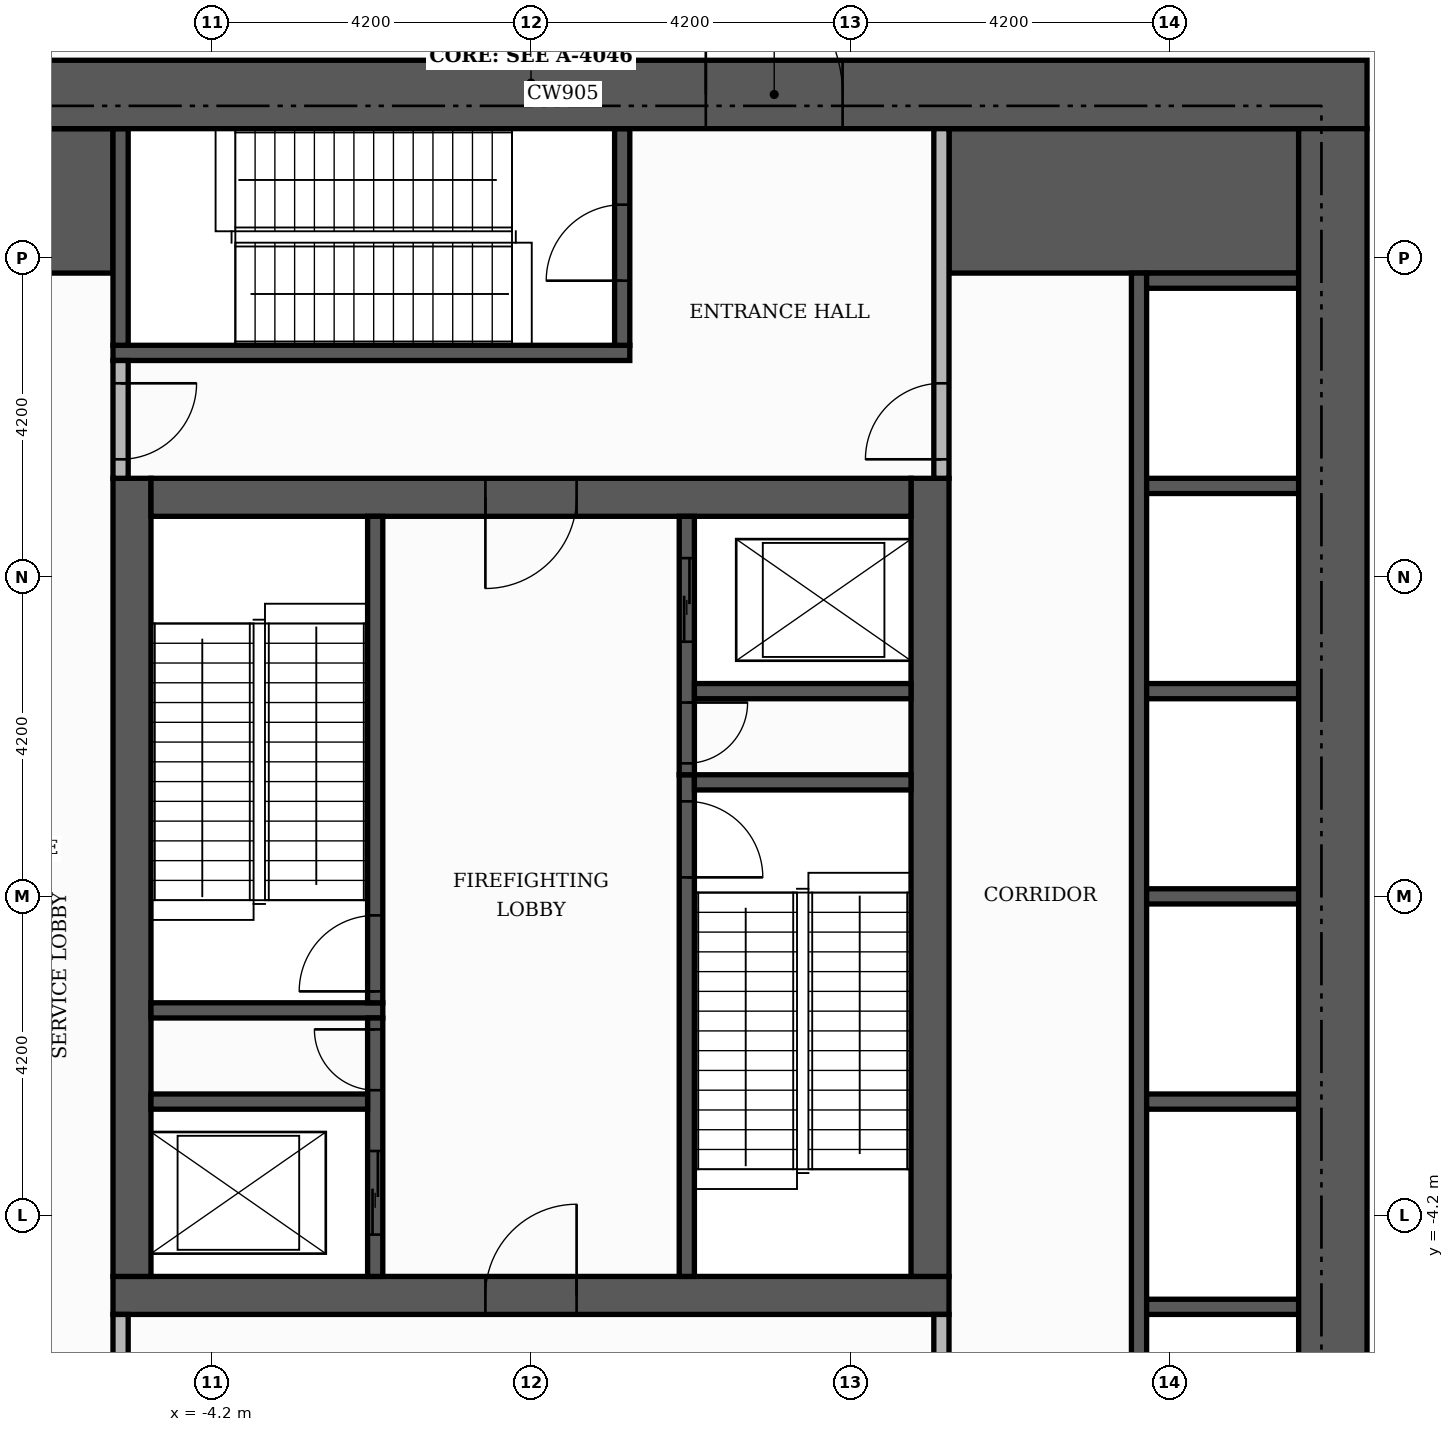
"""IFC4 building model, lengths in metres.
Left out: names, types, materials, properties, quantities, classifications, styles, units other than length and angle.
Written with IfcOpenShell. Run it as: python <this file> out.ifc"""

import sys

from ifc_helpers import new_model, si_unit, direction, frame, frame_2d, origin, place, context, subcontext, project, spatial, rectangle, extrude, element, fill, save


model = new_model("IFC4")
c1 = context("Model", 3, precision=1e-05, world=origin(), true_north=direction((0.0, 1.0)))
c2 = subcontext(c1, "Body", "Model", "MODEL_VIEW")
j1 = project(units=[si_unit("LENGTHUNIT", "METRE"), si_unit("PLANEANGLEUNIT", "RADIAN")], contexts=[c1])
p1 = place(None, origin())
s1 = spatial("IfcSite", under=j1, at=p1, CompositionType="ELEMENT")
p2 = place(p1, origin())
s2 = spatial("IfcBuilding", under=s1, at=p2, CompositionType="ELEMENT")
p3 = place(p2, frame((0.0, 0.0, 287.4)))
s3 = spatial("IfcBuildingStorey", under=s2, at=p3, CompositionType="ELEMENT", Elevation=287.4)
p4 = place(p3, frame((-5.5, -5.25, 0.0), z_axis=(0.0, 0.0, 1.0), x_axis=(1.0, 0.0, 0.0)))
e1 = element("IfcWall", 1, at=p4, inside=s3, PredefinedType="SHEAR", context=c2, shape_type="SweptSolid", body=[
    extrude(rectangle(XDim=11.0, YDim=0.5, at=frame_2d((5.5, 0.0))), origin(), (0.0, 0.0, 1.0), 5.05),
])
p5 = place(p4, frame((4.9, 0.0, 0.0)))
e2 = element("IfcOpeningElement", 2, at=p5, cuts=e1, PredefinedType="OPENING", context=c2, shape_type="SweptSolid", body=[
    extrude(rectangle(XDim=1.2, YDim=2.1, at=frame_2d((0.6, 1.05))), frame((0.0, 0.26, 0.0), z_axis=(0.0, -1.0, 0.0), x_axis=(1.0, 0.0, 0.0)), (0.0, 0.0, 1.0), 0.52),
])
for number, where, z_axis, x_axis in (
    (3, (-5.25, -5.0, 0.0), (0.0, 0.0, 1.0), (0.0, 1.0, 0.0)),
    (4, (5.25, -5.0, 0.0), (0.0, 0.0, 1.0), (0.0, 1.0, 0.0)),
):
    element("IfcWall", number, at=place(p3, frame(where, z_axis=z_axis, x_axis=x_axis)), inside=s3, PredefinedType="SHEAR", context=c2, shape_type="SweptSolid", body=[
        extrude(rectangle(XDim=10.5, YDim=0.5, at=frame_2d((5.25, 0.0))), origin(), (0.0, 0.0, 1.0), 5.05),
    ])
p6 = place(p3, frame((-5.0, 5.25, 0.0), z_axis=(0.0, 0.0, 1.0), x_axis=(1.0, 0.0, 0.0)))
e5 = element("IfcWall", 5, at=p6, inside=s3, PredefinedType="SHEAR", context=c2, shape_type="SweptSolid", body=[
    extrude(rectangle(XDim=10.0, YDim=0.5, at=frame_2d((5.0, 0.0))), origin(), (0.0, 0.0, 1.0), 5.05),
])
p7 = place(p6, frame((4.4, 0.0, 0.0)))
e6 = element("IfcOpeningElement", 6, at=p7, cuts=e5, PredefinedType="OPENING", context=c2, shape_type="SweptSolid", body=[
    extrude(rectangle(XDim=1.2, YDim=2.1, at=frame_2d((0.6, 1.05))), frame((0.0, 0.26, 0.0), z_axis=(0.0, -1.0, 0.0), x_axis=(1.0, 0.0, 0.0)), (0.0, 0.0, 1.0), 0.52),
])
for number, where, z_axis, x_axis in (
    (7, (-10.1, 9.15, 0.0), (0.0, 0.0, 1.0), (1.0, 0.0, 0.0)),
    (8, (5.5, 9.15, 0.0), (0.0, 0.0, 1.0), (1.0, 0.0, 0.0)),
):
    element("IfcWall", number, at=place(p3, frame(where, z_axis=z_axis, x_axis=x_axis)), inside=s3, PredefinedType="SHEAR", context=c2, shape_type="SweptSolid", body=[
        extrude(rectangle(XDim=4.6, YDim=1.9, at=frame_2d((2.3, 0.0))), origin(), (0.0, 0.0, 1.0), 5.05),
    ])
p8 = place(p3, frame((2.05, -5.0, 0.0), z_axis=(0.0, 0.0, 1.0), x_axis=(0.0, 1.0, 0.0)))
e9 = element("IfcWall", 9, at=p8, inside=s3, PredefinedType="SHEAR", context=c2, shape_type="SweptSolid", body=[
    extrude(rectangle(XDim=6.6, YDim=0.2, at=frame_2d((3.3, 0.0))), origin(), (0.0, 0.0, 1.0), 5.05),
])
p9 = place(p8, frame((5.25, 0.0, 0.0)))
e10 = element("IfcOpeningElement", 10, at=p9, cuts=e9, PredefinedType="OPENING", context=c2, shape_type="SweptSolid", body=[
    extrude(rectangle(XDim=1.0, YDim=2.1, at=frame_2d((0.5, 1.05))), frame((0.0, 0.11, 0.0), z_axis=(0.0, -1.0, 0.0), x_axis=(1.0, 0.0, 0.0)), (0.0, 0.0, 1.0), 0.22),
])
p10 = place(p3, frame((-5.0, -1.5, 0.0), z_axis=(0.0, 0.0, 1.0), x_axis=(1.0, 0.0, 0.0)))
e11 = element("IfcWall", 11, at=p10, inside=s3, PredefinedType="SHEAR", context=c2, shape_type="SweptSolid", body=[
    extrude(rectangle(XDim=3.05, YDim=0.2, at=frame_2d((1.525, 0.0))), origin(), (0.0, 0.0, 1.0), 5.05),
])
p11 = place(p3, frame((-2.05, -1.4, 0.0), z_axis=(0.0, 0.0, 1.0), x_axis=(0.0, 1.0, 0.0)))
e12 = element("IfcWall", 12, at=p11, inside=s3, PredefinedType="SHEAR", context=c2, shape_type="SweptSolid", body=[
    extrude(rectangle(XDim=6.4, YDim=0.2, at=frame_2d((3.2, 0.0))), origin(), (0.0, 0.0, 1.0), 5.05),
])
p12 = place(p11, frame((0.15, 0.0, 0.0)))
e13 = element("IfcOpeningElement", 13, at=p12, cuts=e12, PredefinedType="OPENING", context=c2, shape_type="SweptSolid", body=[
    extrude(rectangle(XDim=1.0, YDim=2.1, at=frame_2d((0.5, 1.05))), frame((0.0, 0.11, 0.0), z_axis=(0.0, -1.0, 0.0), x_axis=(1.0, 0.0, 0.0)), (0.0, 0.0, 1.0), 0.22),
])
p13 = place(p3, frame((2.15, 1.5, 0.0), z_axis=(0.0, 0.0, 1.0), x_axis=(1.0, 0.0, 0.0)))
e14 = element("IfcWall", 14, at=p13, inside=s3, PredefinedType="SHEAR", context=c2, shape_type="SweptSolid", body=[
    extrude(rectangle(XDim=2.85, YDim=0.2, at=frame_2d((1.425, 0.0))), origin(), (0.0, 0.0, 1.0), 5.05),
])
p14 = place(p3, frame((-5.5, 7.15, 0.0), z_axis=(0.0, 0.0, 1.0), x_axis=(1.0, 0.0, 0.0)))
e15 = element("IfcWall", 15, at=p14, inside=s3, PredefinedType="SHEAR", context=c2, shape_type="SweptSolid", body=[
    extrude(rectangle(XDim=6.8, YDim=0.2, at=frame_2d((3.4, 0.0))), origin(), (0.0, 0.0, 1.0), 5.05),
])
p15 = place(p3, frame((-5.4, 7.25, 0.0), z_axis=(0.0, 0.0, 1.0), x_axis=(0.0, 1.0, 0.0)))
e16 = element("IfcWall", 16, at=p15, inside=s3, PredefinedType="SHEAR", context=c2, shape_type="SweptSolid", body=[
    extrude(rectangle(XDim=2.85, YDim=0.2, at=frame_2d((1.425, 0.0))), origin(), (0.0, 0.0, 1.0), 5.05),
])
p16 = place(p3, frame((1.2, 7.25, 0.0), z_axis=(0.0, 0.0, 1.0), x_axis=(0.0, 1.0, 0.0)))
e17 = element("IfcWall", 17, at=p16, inside=s3, PredefinedType="SHEAR", context=c2, shape_type="SweptSolid", body=[
    extrude(rectangle(XDim=2.85, YDim=0.2, at=frame_2d((1.425, 0.0))), origin(), (0.0, 0.0, 1.0), 5.05),
])
p17 = place(p16, frame((0.85, 0.0, 0.0)))
e18 = element("IfcOpeningElement", 18, at=p17, cuts=e17, PredefinedType="OPENING", context=c2, shape_type="SweptSolid", body=[
    extrude(rectangle(XDim=1.0, YDim=2.1, at=frame_2d((0.5, 1.05))), frame((0.0, 0.11, 0.0), z_axis=(0.0, -1.0, 0.0), x_axis=(1.0, 0.0, 0.0)), (0.0, 0.0, 1.0), 0.22),
])
p18 = place(p3, frame((8.0, -8.2, 0.0), z_axis=(0.0, 0.0, 1.0), x_axis=(0.0, 1.0, 0.0)))
e19 = element("IfcWall", 19, at=p18, inside=s3, PredefinedType="SHEAR", context=c2, shape_type="SweptSolid", body=[
    extrude(rectangle(XDim=16.4, YDim=0.2, at=frame_2d((8.2, 0.0))), origin(), (0.0, 0.0, 1.0), 5.05),
])
p19 = place(p3, frame((8.1, -5.4, 0.0), z_axis=(0.0, 0.0, 1.0), x_axis=(1.0, 0.0, 0.0)))
e20 = element("IfcWall", 20, at=p19, inside=s3, PredefinedType="SHEAR", context=c2, shape_type="SweptSolid", body=[
    extrude(rectangle(XDim=2.0, YDim=0.2, at=frame_2d((1.0, 0.0))), origin(), (0.0, 0.0, 1.0), 5.05),
])
p20 = place(p3, frame((-2.05, -5.0, 0.0), z_axis=(0.0, 0.0, 1.0), x_axis=(0.0, 1.0, 0.0)))
e21 = element("IfcWall", 21, at=p20, inside=s3, PredefinedType="SHEAR", context=c2, shape_type="SweptSolid", body=[
    extrude(rectangle(XDim=3.4, YDim=0.2, at=frame_2d((1.7, 0.0))), origin(), (0.0, 0.0, 1.0), 5.05),
])
p21 = place(p20, frame((0.55, 0.0, 0.0)))
e22 = element("IfcOpeningElement", 22, at=p21, cuts=e21, PredefinedType="OPENING", context=c2, shape_type="SweptSolid", body=[
    extrude(rectangle(XDim=1.1, YDim=2.1, at=frame_2d((0.55, 1.05))), frame((0.0, 0.11, 0.0), z_axis=(0.0, -1.0, 0.0), x_axis=(1.0, 0.0, 0.0)), (0.0, 0.0, 1.0), 0.22),
])
p22 = place(p20, frame((2.45, 0.0, 0.0)))
e23 = element("IfcOpeningElement", 23, at=p22, cuts=e21, PredefinedType="OPENING", context=c2, shape_type="SweptSolid", body=[
    extrude(rectangle(XDim=0.8, YDim=2.1, at=frame_2d((0.4, 1.05))), frame((0.0, 0.11, 0.0), z_axis=(0.0, -1.0, 0.0), x_axis=(1.0, 0.0, 0.0)), (0.0, 0.0, 1.0), 0.22),
])
p23 = place(p3, frame((-5.0, -2.7, 0.0), z_axis=(0.0, 0.0, 1.0), x_axis=(1.0, 0.0, 0.0)))
e24 = element("IfcWall", 24, at=p23, inside=s3, PredefinedType="SHEAR", context=c2, shape_type="SweptSolid", body=[
    extrude(rectangle(XDim=2.85, YDim=0.2, at=frame_2d((1.425, 0.0))), origin(), (0.0, 0.0, 1.0), 5.05),
])
for number, where, z_axis, x_axis in (
    (25, (8.1, -2.7, 0.0), (0.0, 0.0, 1.0), (1.0, 0.0, 0.0)),
    (26, (8.1, 0.0, 0.0), (0.0, 0.0, 1.0), (1.0, 0.0, 0.0)),
):
    element("IfcWall", number, at=place(p3, frame(where, z_axis=z_axis, x_axis=x_axis)), inside=s3, PredefinedType="SHEAR", context=c2, shape_type="SweptSolid", body=[
        extrude(rectangle(XDim=2.0, YDim=0.2, at=frame_2d((1.0, 0.0))), origin(), (0.0, 0.0, 1.0), 5.05),
    ])
p24 = place(p3, frame((2.05, 1.6, 0.0), z_axis=(0.0, 0.0, 1.0), x_axis=(0.0, 1.0, 0.0)))
e27 = element("IfcWall", 27, at=p24, inside=s3, PredefinedType="SHEAR", context=c2, shape_type="SweptSolid", body=[
    extrude(rectangle(XDim=3.4, YDim=0.2, at=frame_2d((1.7, 0.0))), origin(), (0.0, 0.0, 1.0), 5.05),
])
p25 = place(p24, frame((1.75, 0.0, 0.0)))
e28 = element("IfcOpeningElement", 28, at=p25, cuts=e27, PredefinedType="OPENING", context=c2, shape_type="SweptSolid", body=[
    extrude(rectangle(XDim=1.1, YDim=2.1, at=frame_2d((0.55, 1.05))), frame((0.0, 0.11, 0.0), z_axis=(0.0, -1.0, 0.0), x_axis=(1.0, 0.0, 0.0)), (0.0, 0.0, 1.0), 0.22),
])
p26 = place(p24, frame((0.15, 0.0, 0.0)))
e29 = element("IfcOpeningElement", 29, at=p26, cuts=e27, PredefinedType="OPENING", context=c2, shape_type="SweptSolid", body=[
    extrude(rectangle(XDim=0.8, YDim=2.1, at=frame_2d((0.4, 1.05))), frame((0.0, 0.11, 0.0), z_axis=(0.0, -1.0, 0.0), x_axis=(1.0, 0.0, 0.0)), (0.0, 0.0, 1.0), 0.22),
])
p27 = place(p3, frame((2.15, 2.7, 0.0), z_axis=(0.0, 0.0, 1.0), x_axis=(1.0, 0.0, 0.0)))
e30 = element("IfcWall", 30, at=p27, inside=s3, PredefinedType="SHEAR", context=c2, shape_type="SweptSolid", body=[
    extrude(rectangle(XDim=2.85, YDim=0.2, at=frame_2d((1.425, 0.0))), origin(), (0.0, 0.0, 1.0), 5.05),
])
for number, where, z_axis, x_axis in (
    (31, (8.1, 2.7, 0.0), (0.0, 0.0, 1.0), (1.0, 0.0, 0.0)),
    (32, (8.1, 5.4, 0.0), (0.0, 0.0, 1.0), (1.0, 0.0, 0.0)),
    (33, (8.1, 8.1, 0.0), (0.0, 0.0, 1.0), (1.0, 0.0, 0.0)),
):
    element("IfcWall", number, at=place(p3, frame(where, z_axis=z_axis, x_axis=x_axis)), inside=s3, PredefinedType="SHEAR", context=c2, shape_type="SweptSolid", body=[
        extrude(rectangle(XDim=2.0, YDim=0.2, at=frame_2d((1.0, 0.0))), origin(), (0.0, 0.0, 1.0), 5.05),
    ])
p28 = place(p3, frame((-11.0, 10.55, 0.0), z_axis=(0.0, 0.0, 1.0), x_axis=(1.0, 0.0, 0.0)))
e34 = element("IfcWall", 34, at=p28, inside=s3, PredefinedType="SHEAR", context=c2, shape_type="SweptSolid", body=[
    extrude(rectangle(XDim=22.0, YDim=0.9, at=frame_2d((11.0, 0.0))), origin(), (0.0, 0.0, 1.0), 5.05),
])
p29 = place(p28, frame((13.3, 0.0, 0.0)))
e35 = element("IfcOpeningElement", 35, at=p29, cuts=e34, PredefinedType="OPENING", context=c2, shape_type="SweptSolid", body=[
    extrude(rectangle(XDim=1.8, YDim=2.2, at=frame_2d((0.9, 1.1))), frame((0.0, 0.46, 0.0), z_axis=(0.0, -1.0, 0.0), x_axis=(1.0, 0.0, 0.0)), (0.0, 0.0, 1.0), 0.92),
])
p30 = place(p3, frame((10.55, -10.1, 0.0), z_axis=(0.0, 0.0, 1.0), x_axis=(0.0, 1.0, 0.0)))
e36 = element("IfcWall", 36, at=p30, inside=s3, PredefinedType="SHEAR", context=c2, shape_type="SweptSolid", body=[
    extrude(rectangle(XDim=20.2, YDim=0.9, at=frame_2d((10.1, 0.0))), origin(), (0.0, 0.0, 1.0), 5.05),
])
p31 = place(p3, frame((-5.4, -10.1, 0.0), z_axis=(0.0, 0.0, 1.0), x_axis=(0.0, 1.0, 0.0)))
e37 = element("IfcWall", 37, at=p31, inside=s3, PredefinedType="PARTITIONING", context=c2, shape_type="SweptSolid", body=[
    extrude(rectangle(XDim=4.6, YDim=0.2, at=frame_2d((2.3, 0.0))), origin(), (0.0, 0.0, 1.0), 5.05),
])
p32 = place(p31, frame((2.9, 0.0, 0.0)))
e38 = element("IfcOpeningElement", 38, at=p32, cuts=e37, PredefinedType="OPENING", context=c2, shape_type="SweptSolid", body=[
    extrude(rectangle(XDim=1.0, YDim=2.1, at=frame_2d((0.5, 1.05))), frame((0.0, 0.11, 0.0), z_axis=(0.0, -1.0, 0.0), x_axis=(1.0, 0.0, 0.0)), (0.0, 0.0, 1.0), 0.22),
])
p33 = place(p3, frame((5.4, -10.1, 0.0), z_axis=(0.0, 0.0, 1.0), x_axis=(0.0, 1.0, 0.0)))
e39 = element("IfcWall", 39, at=p33, inside=s3, PredefinedType="PARTITIONING", context=c2, shape_type="SweptSolid", body=[
    extrude(rectangle(XDim=4.6, YDim=0.2, at=frame_2d((2.3, 0.0))), origin(), (0.0, 0.0, 1.0), 5.05),
])
p34 = place(p33, frame((2.9, 0.0, 0.0)))
e40 = element("IfcOpeningElement", 40, at=p34, cuts=e39, PredefinedType="OPENING", context=c2, shape_type="SweptSolid", body=[
    extrude(rectangle(XDim=1.0, YDim=2.1, at=frame_2d((0.5, 1.05))), frame((0.0, 0.11, 0.0), z_axis=(0.0, -1.0, 0.0), x_axis=(1.0, 0.0, 0.0)), (0.0, 0.0, 1.0), 0.22),
])
p35 = place(p3, frame((-5.4, 5.5, 0.0), z_axis=(0.0, 0.0, 1.0), x_axis=(0.0, 1.0, 0.0)))
e41 = element("IfcWall", 41, at=p35, inside=s3, PredefinedType="PARTITIONING", context=c2, shape_type="SweptSolid", body=[
    extrude(rectangle(XDim=1.55, YDim=0.2, at=frame_2d((0.775, 0.0))), origin(), (0.0, 0.0, 1.0), 5.05),
])
p36 = place(p35, frame((0.25, 0.0, 0.0)))
e42 = element("IfcOpeningElement", 42, at=p36, cuts=e41, PredefinedType="OPENING", context=c2, shape_type="SweptSolid", body=[
    extrude(rectangle(XDim=1.0, YDim=2.1, at=frame_2d((0.5, 1.05))), frame((0.0, 0.11, 0.0), z_axis=(0.0, -1.0, 0.0), x_axis=(1.0, 0.0, 0.0)), (0.0, 0.0, 1.0), 0.22),
])
p37 = place(p3, frame((5.4, 5.5, 0.0), z_axis=(0.0, 0.0, 1.0), x_axis=(0.0, 1.0, 0.0)))
e43 = element("IfcWall", 43, at=p37, inside=s3, PredefinedType="PARTITIONING", context=c2, shape_type="SweptSolid", body=[
    extrude(rectangle(XDim=4.6, YDim=0.2, at=frame_2d((2.3, 0.0))), origin(), (0.0, 0.0, 1.0), 5.05),
])
p38 = place(p37, frame((0.25, 0.0, 0.0)))
e44 = element("IfcOpeningElement", 44, at=p38, cuts=e43, PredefinedType="OPENING", context=c2, shape_type="SweptSolid", body=[
    extrude(rectangle(XDim=1.0, YDim=2.1, at=frame_2d((0.5, 1.05))), frame((0.0, 0.11, 0.0), z_axis=(0.0, -1.0, 0.0), x_axis=(1.0, 0.0, 0.0)), (0.0, 0.0, 1.0), 0.22),
])
p39 = place(p25, origin())
e45 = element("IfcDoor", 45, at=p39, inside=s3, OperationType="SLIDING_TO_LEFT", PredefinedType="DOOR", context=c2, shape_type="SweptSolid", body=[
    extrude(rectangle(XDim=1.1, YDim=2.1, at=frame_2d((0.55, 1.05))), frame((0.0, 0.025, 0.0), z_axis=(0.0, -1.0, 0.0), x_axis=(1.0, 0.0, 0.0)), (0.0, 0.0, 1.0), 0.05),
])
fill(e28, e45)
p40 = place(p21, origin())
e46 = element("IfcDoor", 46, at=p40, inside=s3, OperationType="SLIDING_TO_LEFT", PredefinedType="DOOR", context=c2, shape_type="SweptSolid", body=[
    extrude(rectangle(XDim=1.1, YDim=2.1, at=frame_2d((0.55, 1.05))), frame((0.0, 0.025, 0.0), z_axis=(0.0, -1.0, 0.0), x_axis=(1.0, 0.0, 0.0)), (0.0, 0.0, 1.0), 0.05),
])
fill(e22, e46)
p41 = place(p12, origin())
e47 = element("IfcDoor", 47, at=p41, inside=s3, OperationType="SINGLE_SWING_LEFT", PredefinedType="DOOR", context=c2, shape_type="SweptSolid", body=[
    extrude(rectangle(XDim=1.0, YDim=2.1, at=frame_2d((0.5, 1.05))), frame((0.0, 0.025, 0.0), z_axis=(0.0, -1.0, 0.0), x_axis=(1.0, 0.0, 0.0)), (0.0, 0.0, 1.0), 0.05),
])
fill(e13, e47)
p42 = place(p9, frame((1.0, 0.0, 0.0), z_axis=(0.0, 0.0, 1.0), x_axis=(-1.0, 0.0, 0.0)))
e48 = element("IfcDoor", 48, at=p42, inside=s3, OperationType="SINGLE_SWING_LEFT", PredefinedType="DOOR", context=c2, shape_type="SweptSolid", body=[
    extrude(rectangle(XDim=1.0, YDim=2.1, at=frame_2d((0.5, 1.05))), frame((0.0, 0.025, 0.0), z_axis=(0.0, -1.0, 0.0), x_axis=(1.0, 0.0, 0.0)), (0.0, 0.0, 1.0), 0.05),
])
fill(e10, e48)
p43 = place(p26, frame((0.8, 0.0, 0.0), z_axis=(0.0, 0.0, 1.0), x_axis=(-1.0, 0.0, 0.0)))
e49 = element("IfcDoor", 49, at=p43, inside=s3, OperationType="SINGLE_SWING_RIGHT", PredefinedType="DOOR", context=c2, shape_type="SweptSolid", body=[
    extrude(rectangle(XDim=0.8, YDim=2.1, at=frame_2d((0.4, 1.05))), frame((0.0, 0.025, 0.0), z_axis=(0.0, -1.0, 0.0), x_axis=(1.0, 0.0, 0.0)), (0.0, 0.0, 1.0), 0.05),
])
fill(e29, e49)
p44 = place(p22, origin())
e50 = element("IfcDoor", 50, at=p44, inside=s3, OperationType="SINGLE_SWING_RIGHT", PredefinedType="DOOR", context=c2, shape_type="SweptSolid", body=[
    extrude(rectangle(XDim=0.8, YDim=2.1, at=frame_2d((0.4, 1.05))), frame((0.0, 0.025, 0.0), z_axis=(0.0, -1.0, 0.0), x_axis=(1.0, 0.0, 0.0)), (0.0, 0.0, 1.0), 0.05),
])
fill(e23, e50)
p45 = place(p7, frame((1.2, 0.0, 0.0), z_axis=(0.0, 0.0, 1.0), x_axis=(-1.0, 0.0, 0.0)))
e51 = element("IfcDoor", 51, at=p45, inside=s3, OperationType="SINGLE_SWING_LEFT", PredefinedType="DOOR", context=c2, shape_type="SweptSolid", body=[
    extrude(rectangle(XDim=1.2, YDim=2.1, at=frame_2d((0.6, 1.05))), frame((0.0, 0.025, 0.0), z_axis=(0.0, -1.0, 0.0), x_axis=(1.0, 0.0, 0.0)), (0.0, 0.0, 1.0), 0.05),
])
fill(e6, e51)
p46 = place(p5, origin())
e52 = element("IfcDoor", 52, at=p46, inside=s3, OperationType="SINGLE_SWING_RIGHT", PredefinedType="DOOR", context=c2, shape_type="SweptSolid", body=[
    extrude(rectangle(XDim=1.2, YDim=2.1, at=frame_2d((0.6, 1.05))), frame((0.0, 0.025, 0.0), z_axis=(0.0, -1.0, 0.0), x_axis=(1.0, 0.0, 0.0)), (0.0, 0.0, 1.0), 0.05),
])
fill(e2, e52)
p47 = place(p17, origin())
e53 = element("IfcDoor", 53, at=p47, inside=s3, OperationType="SINGLE_SWING_LEFT", PredefinedType="DOOR", context=c2, shape_type="SweptSolid", body=[
    extrude(rectangle(XDim=1.0, YDim=2.1, at=frame_2d((0.5, 1.05))), frame((0.0, 0.025, 0.0), z_axis=(0.0, -1.0, 0.0), x_axis=(1.0, 0.0, 0.0)), (0.0, 0.0, 1.0), 0.05),
])
fill(e18, e53)
p48 = place(p36, frame((1.0, 0.0, 0.0), z_axis=(0.0, 0.0, 1.0), x_axis=(-1.0, 0.0, 0.0)))
e54 = element("IfcDoor", 54, at=p48, inside=s3, OperationType="SINGLE_SWING_RIGHT", PredefinedType="DOOR", context=c2, shape_type="SweptSolid", body=[
    extrude(rectangle(XDim=1.0, YDim=2.1, at=frame_2d((0.5, 1.05))), frame((0.0, 0.025, 0.0), z_axis=(0.0, -1.0, 0.0), x_axis=(1.0, 0.0, 0.0)), (0.0, 0.0, 1.0), 0.05),
])
fill(e42, e54)
p49 = place(p38, origin())
e55 = element("IfcDoor", 55, at=p49, inside=s3, OperationType="SINGLE_SWING_LEFT", PredefinedType="DOOR", context=c2, shape_type="SweptSolid", body=[
    extrude(rectangle(XDim=1.0, YDim=2.1, at=frame_2d((0.5, 1.05))), frame((0.0, 0.025, 0.0), z_axis=(0.0, -1.0, 0.0), x_axis=(1.0, 0.0, 0.0)), (0.0, 0.0, 1.0), 0.05),
])
fill(e44, e55)
p50 = place(p29, origin())
e56 = element("IfcDoor", 56, at=p50, inside=s3, OperationType="DOUBLE_DOOR_SINGLE_SWING", PredefinedType="DOOR", context=c2, shape_type="SweptSolid", body=[
    extrude(rectangle(XDim=1.8, YDim=2.2, at=frame_2d((0.9, 1.1))), frame((0.0, 0.025, 0.0), z_axis=(0.0, -1.0, 0.0), x_axis=(1.0, 0.0, 0.0)), (0.0, 0.0, 1.0), 0.05),
])
fill(e35, e56)
save(model, sys.argv[1])
